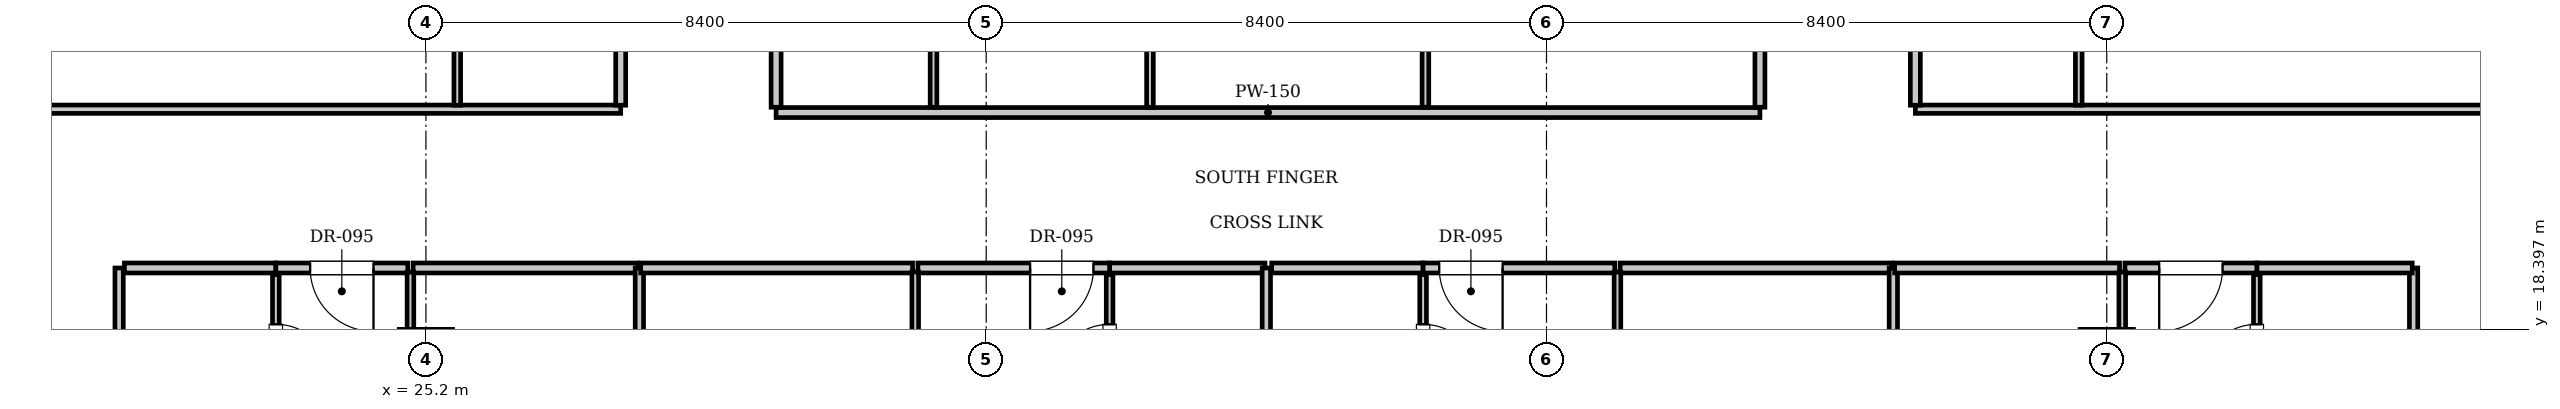
"""IFC4 building model, lengths in metres.
Left out: names, types, materials, properties, quantities, classifications, styles, units other than length and angle.
Written with IfcOpenShell. Run it as: python <this file> out.ifc"""

import sys

from ifc_helpers import new_model, si_unit, direction, frame, frame_2d, origin, origin_2d, place, context, subcontext, project, spatial, rectangle, extrude, element, fill, save


model = new_model("IFC4")
c1 = context("Model", 3, precision=1e-05, world=origin(), true_north=direction((0.0, 1.0)))
c2 = subcontext(c1, "Body", "Model", "MODEL_VIEW")
j1 = project(units=[si_unit("LENGTHUNIT", "METRE"), si_unit("PLANEANGLEUNIT", "RADIAN")], contexts=[c1])
p1 = place(None, origin())
s1 = spatial("IfcSite", under=j1, at=p1, CompositionType="ELEMENT")
p2 = place(p1, origin())
s2 = spatial("IfcBuilding", under=s1, at=p2, CompositionType="ELEMENT")
p3 = place(p2, frame((0.0, 0.0, 312.55)))
s3 = spatial("IfcBuildingStorey", under=s2, at=p3, CompositionType="ELEMENT", Elevation=312.55)
for number, where, z_axis, x_axis in (
    (1, (25.2, 18.0, 0.0), (0.0, 0.0, 1.0), (1.0, 0.0, 0.0)),
    (2, (50.4, 18.0, 0.0), (0.0, 0.0, 1.0), (1.0, 0.0, 0.0)),
):
    element("IfcColumn", number, at=place(p3, frame(where, z_axis=z_axis, x_axis=x_axis)), inside=s3, PredefinedType="COLUMN", context=c2, shape_type="SweptSolid", body=[
        extrude(rectangle(XDim=0.8, YDim=0.8, at=origin_2d()), origin(), (0.0, 0.0, 1.0), 3.85),
    ])
p4 = place(p3, frame((30.45, 21.65, 0.0), z_axis=(0.0, 0.0, 1.0), x_axis=(1.0, 0.0, 0.0)))
e3 = element("IfcWall", 3, at=p4, inside=s3, PredefinedType="PARTITIONING", context=c2, shape_type="SweptSolid", body=[
    extrude(rectangle(XDim=14.75, YDim=0.15, at=frame_2d((7.375, 0.0))), origin(), (0.0, 0.0, 1.0), 3.55),
])
for number, where, z_axis, x_axis in (
    (4, (30.45, 21.73, 0.0), (0.0, 0.0, 1.0), (0.0, 1.0, 0.0)),
    (5, (45.2, 21.73, 0.0), (0.0, 0.0, 1.0), (0.0, 1.0, 0.0)),
):
    element("IfcWall", number, at=place(p3, frame(where, z_axis=z_axis, x_axis=x_axis)), inside=s3, PredefinedType="PARTITIONING", context=c2, shape_type="SweptSolid", body=[
        extrude(rectangle(XDim=8.49, YDim=0.15, at=frame_2d((4.245, 0.0))), origin(), (0.0, 0.0, 1.0), 3.55),
    ])
for number, where, z_axis, x_axis in (
    (6, (32.81, 21.73, 0.0), (0.0, 0.0, 1.0), (0.0, 1.0, 0.0)),
    (7, (36.055, 21.73, 0.0), (0.0, 0.0, 1.0), (0.0, 1.0, 0.0)),
    (8, (40.185, 21.73, 0.0), (0.0, 0.0, 1.0), (0.0, 1.0, 0.0)),
):
    element("IfcWall", number, at=place(p3, frame(where, z_axis=z_axis, x_axis=x_axis)), inside=s3, PredefinedType="PARTITIONING", context=c2, shape_type="SweptSolid", body=[
        extrude(rectangle(XDim=8.49, YDim=0.1, at=frame_2d((4.245, 0.0))), origin(), (0.0, 0.0, 1.0), 3.55),
    ])
for number, where, z_axis, x_axis in (
    (9, (20.6, 14.4, 0.0), (0.0, 0.0, 1.0), (0.0, 1.0, 0.0)),
    (10, (55.0, 14.4, 0.0), (0.0, 0.0, 1.0), (0.0, 1.0, 0.0)),
):
    element("IfcWall", number, at=place(p3, frame(where, z_axis=z_axis, x_axis=x_axis)), inside=s3, PredefinedType="PARTITIONING", context=c2, shape_type="SweptSolid", body=[
        extrude(rectangle(XDim=4.92, YDim=0.125, at=frame_2d((2.46, 0.0))), origin(), (0.0, 0.0, 1.0), 3.55),
    ])
p5 = place(p3, frame((20.68, 19.32, 0.0), z_axis=(0.0, 0.0, 1.0), x_axis=(1.0, 0.0, 0.0)))
e11 = element("IfcWall", 11, at=p5, inside=s3, PredefinedType="PARTITIONING", context=c2, shape_type="SweptSolid", body=[
    extrude(rectangle(XDim=2.27, YDim=0.15, at=frame_2d((1.135, 0.0))), origin(), (0.0, 0.0, 1.0), 3.55),
])
p6 = place(p3, frame((22.95, 16.88, 0.0), z_axis=(0.0, 0.0, 1.0), x_axis=(0.0, 1.0, 0.0)))
e12 = element("IfcWall", 12, at=p6, inside=s3, PredefinedType="PARTITIONING", context=c2, shape_type="SweptSolid", body=[
    extrude(rectangle(XDim=2.34, YDim=0.1, at=frame_2d((1.17, 0.0))), origin(), (0.0, 0.0, 1.0), 3.55),
])
p7 = place(p6, frame((0.745, 0.0, 0.0)))
e13 = element("IfcOpeningElement", 13, at=p7, cuts=e12, PredefinedType="OPENING", context=c2, shape_type="SweptSolid", body=[
    extrude(rectangle(XDim=0.85, YDim=2.1, at=frame_2d((0.425, 1.05))), frame((0.0, 0.06, 0.0), z_axis=(0.0, -1.0, 0.0), x_axis=(1.0, 0.0, 0.0)), (0.0, 0.0, 1.0), 0.12),
])
p8 = place(p3, frame((22.95, 19.32, 0.0), z_axis=(0.0, 0.0, 1.0), x_axis=(1.0, 0.0, 0.0)))
e14 = element("IfcWall", 14, at=p8, inside=s3, PredefinedType="PARTITIONING", context=c2, shape_type="SweptSolid", body=[
    extrude(rectangle(XDim=1.978, YDim=0.15, at=frame_2d((0.989, 0.0))), origin(), (0.0, 0.0, 1.0), 3.55),
])
p9 = place(p8, frame((0.514, 0.0, 0.0)))
e15 = element("IfcOpeningElement", 15, at=p9, cuts=e14, PredefinedType="OPENING", context=c2, shape_type="SweptSolid", body=[
    extrude(rectangle(XDim=0.95, YDim=2.15, at=frame_2d((0.475, 1.075))), frame((0.0, 0.085, 0.0), z_axis=(0.0, -1.0, 0.0), x_axis=(1.0, 0.0, 0.0)), (0.0, 0.0, 1.0), 0.17),
])
p10 = place(p3, frame((25.008, 19.32, 0.0), z_axis=(0.0, 0.0, 1.0), x_axis=(1.0, 0.0, 0.0)))
e16 = element("IfcWall", 16, at=p10, inside=s3, PredefinedType="PARTITIONING", context=c2, shape_type="SweptSolid", body=[
    extrude(rectangle(XDim=3.372, YDim=0.15, at=frame_2d((1.686, 0.0))), origin(), (0.0, 0.0, 1.0), 3.55),
])
p11 = place(p3, frame((24.968, 9.23, 0.0), z_axis=(0.0, 0.0, 1.0), x_axis=(0.0, 1.0, 0.0)))
e17 = element("IfcWall", 17, at=p11, inside=s3, PredefinedType="PARTITIONING", context=c2, shape_type="SweptSolid", body=[
    extrude(rectangle(XDim=10.03, YDim=0.1, at=frame_2d((5.015, 0.0))), origin(), (0.0, 0.0, 1.0), 3.55),
])
p12 = place(p11, frame((1.6, 0.0, 0.0)))
e18 = element("IfcOpeningElement", 18, at=p12, cuts=e17, PredefinedType="OPENING", context=c2, shape_type="SweptSolid", body=[
    extrude(rectangle(XDim=0.9, YDim=2.1, at=frame_2d((0.45, 1.05))), frame((0.0, 0.06, 0.0), z_axis=(0.0, -1.0, 0.0), x_axis=(1.0, 0.0, 0.0)), (0.0, 0.0, 1.0), 0.12),
])
p13 = place(p3, frame((28.4, 9.3, 0.0), z_axis=(0.0, 0.0, 1.0), x_axis=(0.0, 1.0, 0.0)))
e19 = element("IfcWall", 19, at=p13, inside=s3, PredefinedType="PARTITIONING", context=c2, shape_type="SweptSolid", body=[
    extrude(rectangle(XDim=10.02, YDim=0.125, at=frame_2d((5.01, 0.0))), origin(), (0.0, 0.0, 1.0), 3.55),
])
p14 = place(p3, frame((35.45, 19.32, 0.0), z_axis=(0.0, 0.0, 1.0), x_axis=(1.0, 0.0, 0.0)))
e20 = element("IfcWall", 20, at=p14, inside=s3, PredefinedType="PARTITIONING", context=c2, shape_type="SweptSolid", body=[
    extrude(rectangle(XDim=2.33, YDim=0.15, at=frame_2d((1.165, 0.0))), origin(), (0.0, 0.0, 1.0), 3.55),
])
p15 = place(p3, frame((35.45, 16.88, 0.0), z_axis=(0.0, 0.0, 1.0), x_axis=(0.0, 1.0, 0.0)))
e21 = element("IfcWall", 21, at=p15, inside=s3, PredefinedType="PARTITIONING", context=c2, shape_type="SweptSolid", body=[
    extrude(rectangle(XDim=2.34, YDim=0.1, at=frame_2d((1.17, 0.0))), origin(), (0.0, 0.0, 1.0), 3.55),
])
p16 = place(p15, frame((0.745, 0.0, 0.0)))
e22 = element("IfcOpeningElement", 22, at=p16, cuts=e21, PredefinedType="OPENING", context=c2, shape_type="SweptSolid", body=[
    extrude(rectangle(XDim=0.85, YDim=2.1, at=frame_2d((0.425, 1.05))), frame((0.0, 0.06, 0.0), z_axis=(0.0, -1.0, 0.0), x_axis=(1.0, 0.0, 0.0)), (0.0, 0.0, 1.0), 0.12),
])
p17 = place(p3, frame((28.42, 19.32, 0.0), z_axis=(0.0, 0.0, 1.0), x_axis=(1.0, 0.0, 0.0)))
e23 = element("IfcWall", 23, at=p17, inside=s3, PredefinedType="PARTITIONING", context=c2, shape_type="SweptSolid", body=[
    extrude(rectangle(XDim=4.076, YDim=0.15, at=frame_2d((2.038, 0.0))), origin(), (0.0, 0.0, 1.0), 3.55),
])
p18 = place(p3, frame((32.576, 19.32, 0.0), z_axis=(0.0, 0.0, 1.0), x_axis=(1.0, 0.0, 0.0)))
e24 = element("IfcWall", 24, at=p18, inside=s3, PredefinedType="PARTITIONING", context=c2, shape_type="SweptSolid", body=[
    extrude(rectangle(XDim=2.874, YDim=0.15, at=frame_2d((1.437, 0.0))), origin(), (0.0, 0.0, 1.0), 3.55),
])
p19 = place(p18, frame((1.682, 0.0, 0.0)))
e25 = element("IfcOpeningElement", 25, at=p19, cuts=e24, PredefinedType="OPENING", context=c2, shape_type="SweptSolid", body=[
    extrude(rectangle(XDim=0.95, YDim=2.15, at=frame_2d((0.475, 1.075))), frame((0.0, 0.085, 0.0), z_axis=(0.0, -1.0, 0.0), x_axis=(1.0, 0.0, 0.0)), (0.0, 0.0, 1.0), 0.17),
])
p20 = place(p3, frame((32.536, 9.23, 0.0), z_axis=(0.0, 0.0, 1.0), x_axis=(0.0, 1.0, 0.0)))
e26 = element("IfcWall", 26, at=p20, inside=s3, PredefinedType="PARTITIONING", context=c2, shape_type="SweptSolid", body=[
    extrude(rectangle(XDim=10.03, YDim=0.1, at=frame_2d((5.015, 0.0))), origin(), (0.0, 0.0, 1.0), 3.55),
])
p21 = place(p20, frame((1.6, 0.0, 0.0)))
e27 = element("IfcOpeningElement", 27, at=p21, cuts=e26, PredefinedType="OPENING", context=c2, shape_type="SweptSolid", body=[
    extrude(rectangle(XDim=0.9, YDim=2.1, at=frame_2d((0.45, 1.05))), frame((0.0, 0.06, 0.0), z_axis=(0.0, -1.0, 0.0), x_axis=(1.0, 0.0, 0.0)), (0.0, 0.0, 1.0), 0.12),
])
p22 = place(p3, frame((37.8, 9.3, 0.0), z_axis=(0.0, 0.0, 1.0), x_axis=(0.0, 1.0, 0.0)))
e28 = element("IfcWall", 28, at=p22, inside=s3, PredefinedType="PARTITIONING", context=c2, shape_type="SweptSolid", body=[
    extrude(rectangle(XDim=10.02, YDim=0.125, at=frame_2d((5.01, 0.0))), origin(), (0.0, 0.0, 1.0), 3.244),
])
p23 = place(p3, frame((37.88, 19.32, 0.0), z_axis=(0.0, 0.0, 1.0), x_axis=(1.0, 0.0, 0.0)))
e29 = element("IfcWall", 29, at=p23, inside=s3, PredefinedType="PARTITIONING", context=c2, shape_type="SweptSolid", body=[
    extrude(rectangle(XDim=2.27, YDim=0.15, at=frame_2d((1.135, 0.0))), origin(), (0.0, 0.0, 1.0), 3.55),
])
p24 = place(p3, frame((40.15, 16.88, 0.0), z_axis=(0.0, 0.0, 1.0), x_axis=(0.0, 1.0, 0.0)))
e30 = element("IfcWall", 30, at=p24, inside=s3, PredefinedType="PARTITIONING", context=c2, shape_type="SweptSolid", body=[
    extrude(rectangle(XDim=2.34, YDim=0.1, at=frame_2d((1.17, 0.0))), origin(), (0.0, 0.0, 1.0), 3.55),
])
p25 = place(p24, frame((0.745, 0.0, 0.0)))
e31 = element("IfcOpeningElement", 31, at=p25, cuts=e30, PredefinedType="OPENING", context=c2, shape_type="SweptSolid", body=[
    extrude(rectangle(XDim=0.85, YDim=2.1, at=frame_2d((0.425, 1.05))), frame((0.0, 0.06, 0.0), z_axis=(0.0, -1.0, 0.0), x_axis=(1.0, 0.0, 0.0)), (0.0, 0.0, 1.0), 0.12),
])
p26 = place(p3, frame((40.15, 19.32, 0.0), z_axis=(0.0, 0.0, 1.0), x_axis=(1.0, 0.0, 0.0)))
e32 = element("IfcWall", 32, at=p26, inside=s3, PredefinedType="PARTITIONING", context=c2, shape_type="SweptSolid", body=[
    extrude(rectangle(XDim=2.874, YDim=0.15, at=frame_2d((1.437, 0.0))), origin(), (0.0, 0.0, 1.0), 3.55),
])
p27 = place(p26, frame((0.242, 0.0, 0.0)))
e33 = element("IfcOpeningElement", 33, at=p27, cuts=e32, PredefinedType="OPENING", context=c2, shape_type="SweptSolid", body=[
    extrude(rectangle(XDim=0.95, YDim=2.15, at=frame_2d((0.475, 1.075))), frame((0.0, 0.085, 0.0), z_axis=(0.0, -1.0, 0.0), x_axis=(1.0, 0.0, 0.0)), (0.0, 0.0, 1.0), 0.17),
])
p28 = place(p3, frame((43.104, 19.32, 0.0), z_axis=(0.0, 0.0, 1.0), x_axis=(1.0, 0.0, 0.0)))
e34 = element("IfcWall", 34, at=p28, inside=s3, PredefinedType="PARTITIONING", context=c2, shape_type="SweptSolid", body=[
    extrude(rectangle(XDim=4.076, YDim=0.15, at=frame_2d((2.038, 0.0))), origin(), (0.0, 0.0, 1.0), 3.55),
])
p29 = place(p3, frame((43.064, 9.23, 0.0), z_axis=(0.0, 0.0, 1.0), x_axis=(0.0, 1.0, 0.0)))
e35 = element("IfcWall", 35, at=p29, inside=s3, PredefinedType="PARTITIONING", context=c2, shape_type="SweptSolid", body=[
    extrude(rectangle(XDim=10.03, YDim=0.1, at=frame_2d((5.015, 0.0))), origin(), (0.0, 0.0, 1.0), 3.55),
])
p30 = place(p29, frame((1.6, 0.0, 0.0)))
e36 = element("IfcOpeningElement", 36, at=p30, cuts=e35, PredefinedType="OPENING", context=c2, shape_type="SweptSolid", body=[
    extrude(rectangle(XDim=0.9, YDim=2.1, at=frame_2d((0.45, 1.05))), frame((0.0, 0.06, 0.0), z_axis=(0.0, -1.0, 0.0), x_axis=(1.0, 0.0, 0.0)), (0.0, 0.0, 1.0), 0.12),
])
p31 = place(p3, frame((47.2, 9.3, 0.0), z_axis=(0.0, 0.0, 1.0), x_axis=(0.0, 1.0, 0.0)))
e37 = element("IfcWall", 37, at=p31, inside=s3, PredefinedType="PARTITIONING", context=c2, shape_type="SweptSolid", body=[
    extrude(rectangle(XDim=10.02, YDim=0.125, at=frame_2d((5.01, 0.0))), origin(), (0.0, 0.0, 1.0), 3.55),
])
p32 = place(p3, frame((52.65, 19.32, 0.0), z_axis=(0.0, 0.0, 1.0), x_axis=(1.0, 0.0, 0.0)))
e38 = element("IfcWall", 38, at=p32, inside=s3, PredefinedType="PARTITIONING", context=c2, shape_type="SweptSolid", body=[
    extrude(rectangle(XDim=2.33, YDim=0.15, at=frame_2d((1.165, 0.0))), origin(), (0.0, 0.0, 1.0), 3.55),
])
p33 = place(p3, frame((52.65, 16.88, 0.0), z_axis=(0.0, 0.0, 1.0), x_axis=(0.0, 1.0, 0.0)))
e39 = element("IfcWall", 39, at=p33, inside=s3, PredefinedType="PARTITIONING", context=c2, shape_type="SweptSolid", body=[
    extrude(rectangle(XDim=2.34, YDim=0.1, at=frame_2d((1.17, 0.0))), origin(), (0.0, 0.0, 1.0), 3.55),
])
p34 = place(p33, frame((0.745, 0.0, 0.0)))
e40 = element("IfcOpeningElement", 40, at=p34, cuts=e39, PredefinedType="OPENING", context=c2, shape_type="SweptSolid", body=[
    extrude(rectangle(XDim=0.85, YDim=2.1, at=frame_2d((0.425, 1.05))), frame((0.0, 0.06, 0.0), z_axis=(0.0, -1.0, 0.0), x_axis=(1.0, 0.0, 0.0)), (0.0, 0.0, 1.0), 0.12),
])
p35 = place(p3, frame((47.22, 19.32, 0.0), z_axis=(0.0, 0.0, 1.0), x_axis=(1.0, 0.0, 0.0)))
e41 = element("IfcWall", 41, at=p35, inside=s3, PredefinedType="PARTITIONING", context=c2, shape_type="SweptSolid", body=[
    extrude(rectangle(XDim=3.372, YDim=0.15, at=frame_2d((1.686, 0.0))), origin(), (0.0, 0.0, 1.0), 3.55),
])
p36 = place(p3, frame((50.672, 19.32, 0.0), z_axis=(0.0, 0.0, 1.0), x_axis=(1.0, 0.0, 0.0)))
e42 = element("IfcWall", 42, at=p36, inside=s3, PredefinedType="PARTITIONING", context=c2, shape_type="SweptSolid", body=[
    extrude(rectangle(XDim=1.978, YDim=0.15, at=frame_2d((0.989, 0.0))), origin(), (0.0, 0.0, 1.0), 3.55),
])
p37 = place(p36, frame((0.514, 0.0, 0.0)))
e43 = element("IfcOpeningElement", 43, at=p37, cuts=e42, PredefinedType="OPENING", context=c2, shape_type="SweptSolid", body=[
    extrude(rectangle(XDim=0.95, YDim=2.15, at=frame_2d((0.475, 1.075))), frame((0.0, 0.085, 0.0), z_axis=(0.0, -1.0, 0.0), x_axis=(1.0, 0.0, 0.0)), (0.0, 0.0, 1.0), 0.17),
])
p38 = place(p3, frame((50.632, 9.23, 0.0), z_axis=(0.0, 0.0, 1.0), x_axis=(0.0, 1.0, 0.0)))
e44 = element("IfcWall", 44, at=p38, inside=s3, PredefinedType="PARTITIONING", context=c2, shape_type="SweptSolid", body=[
    extrude(rectangle(XDim=10.03, YDim=0.1, at=frame_2d((5.015, 0.0))), origin(), (0.0, 0.0, 1.0), 3.55),
])
p39 = place(p38, frame((1.6, 0.0, 0.0)))
e45 = element("IfcOpeningElement", 45, at=p39, cuts=e44, PredefinedType="OPENING", context=c2, shape_type="SweptSolid", body=[
    extrude(rectangle(XDim=0.9, YDim=2.1, at=frame_2d((0.45, 1.05))), frame((0.0, 0.06, 0.0), z_axis=(0.0, -1.0, 0.0), x_axis=(1.0, 0.0, 0.0)), (0.0, 0.0, 1.0), 0.12),
])
p40 = place(p3, frame((15.5, 21.7, 0.0), z_axis=(0.0, 0.0, 1.0), x_axis=(1.0, 0.0, 0.0)))
e46 = element("IfcWall", 46, at=p40, inside=s3, PredefinedType="PARTITIONING", context=c2, shape_type="SweptSolid", body=[
    extrude(rectangle(XDim=12.62, YDim=0.125, at=frame_2d((6.31, 0.0))), origin(), (0.0, 0.0, 1.0), 3.55),
])
p41 = place(p3, frame((47.53, 21.7, 0.0), z_axis=(0.0, 0.0, 1.0), x_axis=(1.0, 0.0, 0.0)))
e47 = element("IfcWall", 47, at=p41, inside=s3, PredefinedType="PARTITIONING", context=c2, shape_type="SweptSolid", body=[
    extrude(rectangle(XDim=12.57, YDim=0.125, at=frame_2d((6.285, 0.0))), origin(), (0.0, 0.0, 1.0), 3.55),
])
p42 = place(p3, frame((28.12, 21.76, 0.0), z_axis=(0.0, 0.0, 1.0), x_axis=(0.0, 1.0, 0.0)))
e48 = element("IfcWall", 48, at=p42, inside=s3, PredefinedType="PARTITIONING", context=c2, shape_type="SweptSolid", body=[
    extrude(rectangle(XDim=1.89, YDim=0.15, at=frame_2d((0.945, 0.0))), origin(), (0.0, 0.0, 1.0), 3.55),
])
p43 = place(p3, frame((25.67, 21.76, 0.0), z_axis=(0.0, 0.0, 1.0), x_axis=(0.0, 1.0, 0.0)))
e49 = element("IfcWall", 49, at=p43, inside=s3, PredefinedType="PARTITIONING", context=c2, shape_type="SweptSolid", body=[
    extrude(rectangle(XDim=1.89, YDim=0.1, at=frame_2d((0.945, 0.0))), origin(), (0.0, 0.0, 1.0), 3.55),
])
p44 = place(p3, frame((47.53, 21.76, 0.0), z_axis=(0.0, 0.0, 1.0), x_axis=(0.0, 1.0, 0.0)))
e50 = element("IfcWall", 50, at=p44, inside=s3, PredefinedType="PARTITIONING", context=c2, shape_type="SweptSolid", body=[
    extrude(rectangle(XDim=1.89, YDim=0.15, at=frame_2d((0.945, 0.0))), origin(), (0.0, 0.0, 1.0), 3.55),
])
p45 = place(p3, frame((49.98, 21.76, 0.0), z_axis=(0.0, 0.0, 1.0), x_axis=(0.0, 1.0, 0.0)))
e51 = element("IfcWall", 51, at=p45, inside=s3, PredefinedType="PARTITIONING", context=c2, shape_type="SweptSolid", body=[
    extrude(rectangle(XDim=1.89, YDim=0.1, at=frame_2d((0.945, 0.0))), origin(), (0.0, 0.0, 1.0), 3.55),
])
p46 = place(p7, frame((0.85, 0.0, 0.0), z_axis=(0.0, 0.0, 1.0), x_axis=(-1.0, 0.0, 0.0)))
e52 = element("IfcDoor", 52, at=p46, inside=s3, OperationType="SINGLE_SWING_RIGHT", PredefinedType="DOOR", context=c2, shape_type="SweptSolid", body=[
    extrude(rectangle(XDim=0.85, YDim=2.1, at=frame_2d((0.425, 1.05))), frame((0.0, 0.025, 0.0), z_axis=(0.0, -1.0, 0.0), x_axis=(1.0, 0.0, 0.0)), (0.0, 0.0, 1.0), 0.05),
])
fill(e13, e52)
p47 = place(p9, frame((0.95, 0.0, 0.0), z_axis=(0.0, 0.0, 1.0), x_axis=(-1.0, 0.0, 0.0)))
e53 = element("IfcDoor", 53, at=p47, inside=s3, OperationType="SINGLE_SWING_LEFT", PredefinedType="DOOR", context=c2, shape_type="SweptSolid", body=[
    extrude(rectangle(XDim=0.95, YDim=2.15, at=frame_2d((0.475, 1.075))), frame((0.0, 0.025, 0.0), z_axis=(0.0, -1.0, 0.0), x_axis=(1.0, 0.0, 0.0)), (0.0, 0.0, 1.0), 0.05),
])
fill(e15, e53)
p48 = place(p16, origin())
e54 = element("IfcDoor", 54, at=p48, inside=s3, OperationType="SINGLE_SWING_LEFT", PredefinedType="DOOR", context=c2, shape_type="SweptSolid", body=[
    extrude(rectangle(XDim=0.85, YDim=2.1, at=frame_2d((0.425, 1.05))), frame((0.0, 0.025, 0.0), z_axis=(0.0, -1.0, 0.0), x_axis=(1.0, 0.0, 0.0)), (0.0, 0.0, 1.0), 0.05),
])
fill(e22, e54)
p49 = place(p19, frame((0.95, 0.0, 0.0), z_axis=(0.0, 0.0, 1.0), x_axis=(-1.0, 0.0, 0.0)))
e55 = element("IfcDoor", 55, at=p49, inside=s3, OperationType="SINGLE_SWING_RIGHT", PredefinedType="DOOR", context=c2, shape_type="SweptSolid", body=[
    extrude(rectangle(XDim=0.95, YDim=2.15, at=frame_2d((0.475, 1.075))), frame((0.0, 0.025, 0.0), z_axis=(0.0, -1.0, 0.0), x_axis=(1.0, 0.0, 0.0)), (0.0, 0.0, 1.0), 0.05),
])
fill(e25, e55)
p50 = place(p25, frame((0.85, 0.0, 0.0), z_axis=(0.0, 0.0, 1.0), x_axis=(-1.0, 0.0, 0.0)))
e56 = element("IfcDoor", 56, at=p50, inside=s3, OperationType="SINGLE_SWING_RIGHT", PredefinedType="DOOR", context=c2, shape_type="SweptSolid", body=[
    extrude(rectangle(XDim=0.85, YDim=2.1, at=frame_2d((0.425, 1.05))), frame((0.0, 0.025, 0.0), z_axis=(0.0, -1.0, 0.0), x_axis=(1.0, 0.0, 0.0)), (0.0, 0.0, 1.0), 0.05),
])
fill(e31, e56)
p51 = place(p27, frame((0.95, 0.0, 0.0), z_axis=(0.0, 0.0, 1.0), x_axis=(-1.0, 0.0, 0.0)))
e57 = element("IfcDoor", 57, at=p51, inside=s3, OperationType="SINGLE_SWING_LEFT", PredefinedType="DOOR", context=c2, shape_type="SweptSolid", body=[
    extrude(rectangle(XDim=0.95, YDim=2.15, at=frame_2d((0.475, 1.075))), frame((0.0, 0.025, 0.0), z_axis=(0.0, -1.0, 0.0), x_axis=(1.0, 0.0, 0.0)), (0.0, 0.0, 1.0), 0.05),
])
fill(e33, e57)
p52 = place(p34, origin())
e58 = element("IfcDoor", 58, at=p52, inside=s3, OperationType="SINGLE_SWING_LEFT", PredefinedType="DOOR", context=c2, shape_type="SweptSolid", body=[
    extrude(rectangle(XDim=0.85, YDim=2.1, at=frame_2d((0.425, 1.05))), frame((0.0, 0.025, 0.0), z_axis=(0.0, -1.0, 0.0), x_axis=(1.0, 0.0, 0.0)), (0.0, 0.0, 1.0), 0.05),
])
fill(e40, e58)
p53 = place(p37, frame((0.95, 0.0, 0.0), z_axis=(0.0, 0.0, 1.0), x_axis=(-1.0, 0.0, 0.0)))
e59 = element("IfcDoor", 59, at=p53, inside=s3, OperationType="SINGLE_SWING_RIGHT", PredefinedType="DOOR", context=c2, shape_type="SweptSolid", body=[
    extrude(rectangle(XDim=0.95, YDim=2.15, at=frame_2d((0.475, 1.075))), frame((0.0, 0.025, 0.0), z_axis=(0.0, -1.0, 0.0), x_axis=(1.0, 0.0, 0.0)), (0.0, 0.0, 1.0), 0.05),
])
fill(e43, e59)
save(model, sys.argv[1])
